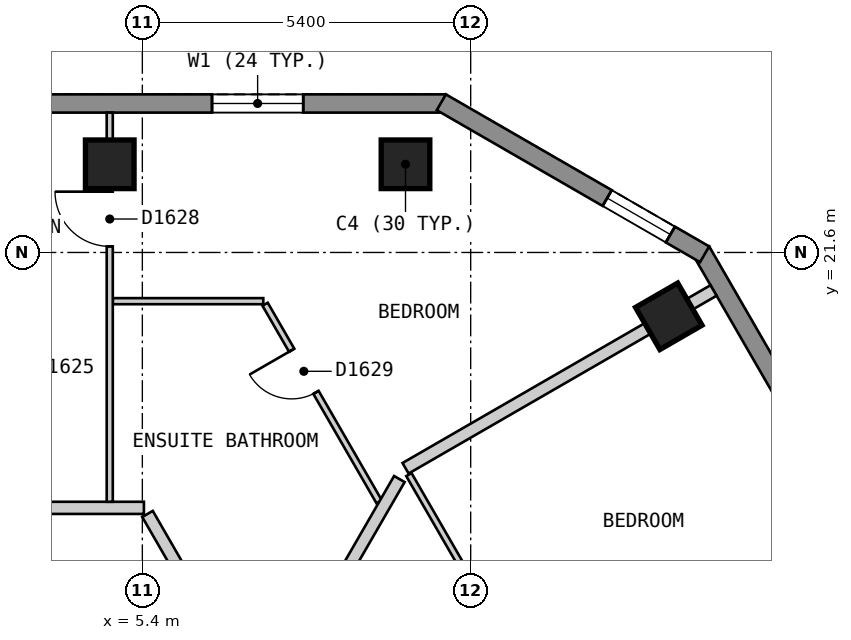
"""IFC4 building model, lengths in metres.
Left out: names, types, materials, properties, quantities, classifications, styles, units other than length and angle.
Written with IfcOpenShell. Run it as: python <this file> out.ifc"""

import sys

from ifc_helpers import new_model, si_unit, direction, frame, frame_2d, origin, origin_2d, place, context, subcontext, project, spatial, polyline, rectangle, outline, extrude, element, fill, save


model = new_model("IFC4")
c1 = context("Model", 3, precision=1e-05, world=origin(), true_north=direction((0.0, 1.0)))
c2 = subcontext(c1, "Body", "Model", "MODEL_VIEW")
j1 = project(units=[si_unit("LENGTHUNIT", "METRE"), si_unit("PLANEANGLEUNIT", "RADIAN")], contexts=[c1])
p1 = place(None, origin())
s1 = spatial("IfcSite", under=j1, at=p1, CompositionType="ELEMENT")
p2 = place(p1, origin())
s2 = spatial("IfcBuilding", under=s1, at=p2, CompositionType="ELEMENT")
p3 = place(p2, frame((0.0, 0.0, 169.2)))
s3 = spatial("IfcBuildingStorey", under=s2, at=p3, CompositionType="ELEMENT", Elevation=169.2)
for number, where, z_axis, x_axis in (
    (1, (9.728, 23.05, 0.0), (0.0, 0.0, 1.0), (-1.0, 0.0, 0.0)),
    (2, (4.864, 23.05, 0.0), (0.0, 0.0, 1.0), (-1.0, 0.0, 0.0)),
    (3, (14.058, 20.55, 0.0), (0.0, 0.0, 1.0), (-0.5, 0.866, 0.0)),
):
    element("IfcColumn", number, at=place(p3, frame(where, z_axis=z_axis, x_axis=x_axis)), inside=s3, PredefinedType="COLUMN", context=c2, shape_type="SweptSolid", body=[
        extrude(rectangle(XDim=0.8, YDim=0.8, at=origin_2d()), origin(), (0.0, 0.0, 1.0), 3.0),
    ])
p4 = place(p3, frame((10.392, 24.05, 0.0), z_axis=(0.0, 0.0, 1.0), x_axis=(-1.0, 0.0, 0.0)))
e4 = element("IfcWall", 4, at=p4, inside=s3, PredefinedType="SOLIDWALL", context=c2, shape_type="SweptSolid", body=[
    extrude(outline(polyline([(0.0, -0.15), (20.784, -0.15), (20.704, 0.15), (0.08, 0.15), (0.0, -0.15)])), origin(), (0.0, 0.0, 1.0), 2.7),
])
p5 = place(p4, frame((2.346, 0.0, 0.15)))
e5 = element("IfcOpeningElement", 5, at=p5, cuts=e4, PredefinedType="OPENING", context=c2, shape_type="SweptSolid", body=[
    extrude(rectangle(XDim=1.5, YDim=2.1, at=frame_2d((0.75, 1.05))), frame((0.0, 0.16, 0.0), z_axis=(0.0, -1.0, 0.0), x_axis=(1.0, 0.0, 0.0)), (0.0, 0.0, 1.0), 0.32),
])
p6 = place(p4, frame((7.21, 0.0, 0.15)))
e6 = element("IfcOpeningElement", 6, at=p6, cuts=e4, PredefinedType="OPENING", context=c2, shape_type="SweptSolid", body=[
    extrude(rectangle(XDim=1.5, YDim=2.1, at=frame_2d((0.75, 1.05))), frame((0.0, 0.16, 0.0), z_axis=(0.0, -1.0, 0.0), x_axis=(1.0, 0.0, 0.0)), (0.0, 0.0, 1.0), 0.32),
])
p7 = place(p4, frame((12.074, 0.0, 0.15)))
e7 = element("IfcOpeningElement", 7, at=p7, cuts=e4, PredefinedType="OPENING", context=c2, shape_type="SweptSolid", body=[
    extrude(rectangle(XDim=1.5, YDim=2.1, at=frame_2d((0.75, 1.05))), frame((0.0, 0.16, 0.0), z_axis=(0.0, -1.0, 0.0), x_axis=(1.0, 0.0, 0.0)), (0.0, 0.0, 1.0), 0.32),
])
p8 = place(p4, frame((16.938, 0.0, 0.15)))
e8 = element("IfcOpeningElement", 8, at=p8, cuts=e4, PredefinedType="OPENING", context=c2, shape_type="SweptSolid", body=[
    extrude(rectangle(XDim=1.5, YDim=2.1, at=frame_2d((0.75, 1.05))), frame((0.0, 0.16, 0.0), z_axis=(0.0, -1.0, 0.0), x_axis=(1.0, 0.0, 0.0)), (0.0, 0.0, 1.0), 0.32),
])
p9 = place(p3, frame((26.024, 1.825, 0.0), z_axis=(0.0, 0.0, 1.0), x_axis=(-0.500010537973, 0.866019319597, 0.0)))
e9 = element("IfcWall", 9, at=p9, inside=s3, PredefinedType="SOLIDWALL", context=c2, shape_type="SweptSolid", body=[
    extrude(outline(polyline([(0.0, -0.15), (22.863, -0.15), (22.783, 0.15), (0.08, 0.15), (0.0, -0.15)])), origin(), (0.0, 0.0, 1.0), 2.7),
])
p10 = place(p9, frame((2.606, 0.0, 0.15)))
e10 = element("IfcOpeningElement", 10, at=p10, cuts=e9, PredefinedType="OPENING", context=c2, shape_type="SweptSolid", body=[
    extrude(rectangle(XDim=1.5, YDim=2.1, at=frame_2d((0.75, 1.05))), frame((0.0, 0.16, 0.0), z_axis=(0.0, -1.0, 0.0), x_axis=(1.0, 0.0, 0.0)), (0.0, 0.0, 1.0), 0.32),
])
p11 = place(p9, frame((7.99, 0.0, 0.15)))
e11 = element("IfcOpeningElement", 11, at=p11, cuts=e9, PredefinedType="OPENING", context=c2, shape_type="SweptSolid", body=[
    extrude(rectangle(XDim=1.5, YDim=2.1, at=frame_2d((0.75, 1.05))), frame((0.0, 0.16, 0.0), z_axis=(0.0, -1.0, 0.0), x_axis=(1.0, 0.0, 0.0)), (0.0, 0.0, 1.0), 0.32),
])
p12 = place(p9, frame((13.373, 0.0, 0.15)))
e12 = element("IfcOpeningElement", 12, at=p12, cuts=e9, PredefinedType="OPENING", context=c2, shape_type="SweptSolid", body=[
    extrude(rectangle(XDim=1.5, YDim=2.1, at=frame_2d((0.75, 1.05))), frame((0.0, 0.16, 0.0), z_axis=(0.0, -1.0, 0.0), x_axis=(1.0, 0.0, 0.0)), (0.0, 0.0, 1.0), 0.32),
])
p13 = place(p9, frame((18.758, 0.0, 0.15)))
e13 = element("IfcOpeningElement", 13, at=p13, cuts=e9, PredefinedType="OPENING", context=c2, shape_type="SweptSolid", body=[
    extrude(rectangle(XDim=1.5, YDim=2.1, at=frame_2d((0.75, 1.05))), frame((0.0, 0.16, 0.0), z_axis=(0.0, -1.0, 0.0), x_axis=(1.0, 0.0, 0.0)), (0.0, 0.0, 1.0), 0.32),
])
p14 = place(p3, frame((14.647, 21.57, 0.0), z_axis=(0.0, 0.0, 1.0), x_axis=(-0.866022959057, 0.500004234368, 0.0)))
e14 = element("IfcWall", 14, at=p14, inside=s3, PredefinedType="SOLIDWALL", context=c2, shape_type="SweptSolid", body=[
    extrude(outline(polyline([(0.0, -0.15), (5.0, -0.15), (4.92, 0.15), (0.08, 0.15), (0.0, -0.15)])), origin(), (0.0, 0.0, 1.0), 2.7),
])
p15 = place(p14, frame((0.65, 0.0, 0.15)))
e15 = element("IfcOpeningElement", 15, at=p15, cuts=e14, PredefinedType="OPENING", context=c2, shape_type="SweptSolid", body=[
    extrude(rectangle(XDim=1.2, YDim=2.1, at=frame_2d((0.6, 1.05))), frame((0.0, 0.16, 0.0), z_axis=(0.0, -1.0, 0.0), x_axis=(1.0, 0.0, 0.0)), (0.0, 0.0, 1.0), 0.32),
])
p16 = place(p3, frame((5.485, 17.3, 0.0), z_axis=(0.0, 0.0, 1.0), x_axis=(0.499965832213, -0.866045129667, 0.0)))
e16 = element("IfcWall", 16, at=p16, inside=s3, PredefinedType="PARTITIONING", context=c2, shape_type="SweptSolid", body=[
    extrude(rectangle(XDim=10.739, YDim=0.2, at=frame_2d((5.369, 0.0))), origin(), (0.0, 0.0, 1.0), 2.7),
])
p17 = place(p16, frame((9.047, 0.0, 0.0)))
e17 = element("IfcOpeningElement", 17, at=p17, cuts=e16, PredefinedType="OPENING", context=c2, shape_type="SweptSolid", body=[
    extrude(rectangle(XDim=1.0, YDim=2.1, at=frame_2d((0.5, 1.05))), frame((0.0, 0.11, 0.0), z_axis=(0.0, -1.0, 0.0), x_axis=(1.0, 0.0, 0.0)), (0.0, 0.0, 1.0), 0.22),
])
p18 = place(p3, frame((-5.312, 17.4, 0.0), z_axis=(0.0, 0.0, 1.0), x_axis=(1.0, 0.0, 0.0)))
e18 = element("IfcWall", 18, at=p18, inside=s3, PredefinedType="PARTITIONING", context=c2, shape_type="SweptSolid", body=[
    extrude(rectangle(XDim=10.738, YDim=0.2, at=frame_2d((5.369, 0.0))), origin(), (0.0, 0.0, 1.0), 2.7),
])
p19 = place(p18, frame((7.294, 0.0, 0.0)))
e19 = element("IfcOpeningElement", 19, at=p19, cuts=e18, PredefinedType="OPENING", context=c2, shape_type="SweptSolid", body=[
    extrude(rectangle(XDim=0.9, YDim=2.1, at=frame_2d((0.45, 1.05))), frame((0.0, 0.11, 0.0), z_axis=(0.0, -1.0, 0.0), x_axis=(1.0, 0.0, 0.0)), (0.0, 0.0, 1.0), 0.22),
])
p20 = place(p3, frame((7.419, 20.749, 0.0), z_axis=(0.0, 0.0, 1.0), x_axis=(0.499917691695, -0.866072919292, 0.0)))
e20 = element("IfcWall", 20, at=p20, inside=s3, PredefinedType="PARTITIONING", context=c2, shape_type="SweptSolid", body=[
    extrude(rectangle(XDim=3.753, YDim=0.1, at=frame_2d((1.876, 0.0))), origin(), (0.0, 0.0, 1.0), 2.7),
])
p21 = place(p20, frame((0.874, 0.0, 0.0)))
e21 = element("IfcOpeningElement", 21, at=p21, cuts=e20, PredefinedType="OPENING", context=c2, shape_type="SweptSolid", body=[
    extrude(rectangle(XDim=0.8, YDim=2.1, at=frame_2d((0.4, 1.05))), frame((0.0, 0.06, 0.0), z_axis=(0.0, -1.0, 0.0), x_axis=(1.0, 0.0, 0.0)), (0.0, 0.0, 1.0), 0.12),
])
p22 = place(p3, frame((9.784, 17.947, 0.0), z_axis=(0.0, 0.0, 1.0), x_axis=(0.500016228266, -0.866016034188, 0.0)))
e22 = element("IfcWall", 22, at=p22, inside=s3, PredefinedType="PARTITIONING", context=c2, shape_type="SweptSolid", body=[
    extrude(rectangle(XDim=11.486, YDim=0.1, at=frame_2d((5.743, 0.0))), origin(), (0.0, 0.0, 1.0), 2.7),
])
p23 = place(p22, frame((7.518, 0.0, 0.0)))
e23 = element("IfcOpeningElement", 23, at=p23, cuts=e22, PredefinedType="OPENING", context=c2, shape_type="SweptSolid", body=[
    extrude(rectangle(XDim=0.9, YDim=2.1, at=frame_2d((0.45, 1.05))), frame((0.0, 0.06, 0.0), z_axis=(0.0, -1.0, 0.0), x_axis=(1.0, 0.0, 0.0)), (0.0, 0.0, 1.0), 0.12),
])
p24 = place(p3, frame((4.914, 20.799, 0.0), z_axis=(0.0, 0.0, 1.0), x_axis=(1.0, 0.0, 0.0)))
e24 = element("IfcWall", 24, at=p24, inside=s3, PredefinedType="PARTITIONING", context=c2, shape_type="SweptSolid", body=[
    extrude(rectangle(XDim=2.475, YDim=0.1, at=frame_2d((1.237, 0.0))), origin(), (0.0, 0.0, 1.0), 2.7),
])
p25 = place(p3, frame((4.864, 17.5, 0.0), z_axis=(0.0, 0.0, 1.0), x_axis=(0.0, 1.0, 0.0)))
e25 = element("IfcWall", 25, at=p25, inside=s3, PredefinedType="PARTITIONING", context=c2, shape_type="SweptSolid", body=[
    extrude(rectangle(XDim=6.4, YDim=0.1, at=frame_2d((3.2, 0.0))), origin(), (0.0, 0.0, 1.0), 2.7),
])
p26 = place(p25, frame((4.2, 0.0, 0.0)))
e26 = element("IfcOpeningElement", 26, at=p26, cuts=e25, PredefinedType="OPENING", context=c2, shape_type="SweptSolid", body=[
    extrude(rectangle(XDim=0.9, YDim=2.1, at=frame_2d((0.45, 1.05))), frame((0.0, 0.06, 0.0), z_axis=(0.0, -1.0, 0.0), x_axis=(1.0, 0.0, 0.0)), (0.0, 0.0, 1.0), 0.12),
])
p27 = place(p3, frame((7.448, 14.1, 0.0), z_axis=(0.0, 0.0, 1.0), x_axis=(0.500013426303, 0.866017651966, 0.0)))
e27 = element("IfcWall", 27, at=p27, inside=s3, PredefinedType="PARTITIONING", context=c2, shape_type="SweptSolid", body=[
    extrude(rectangle(XDim=4.358, YDim=0.2, at=frame_2d((2.179, 0.0))), origin(), (0.0, 0.0, 1.0), 2.7),
])
p28 = place(p3, frame((9.729, 18.051, 0.0), z_axis=(0.0, 0.0, 1.0), x_axis=(0.866038213712, 0.499977811898, 0.0)))
e28 = element("IfcWall", 28, at=p28, inside=s3, PredefinedType="PARTITIONING", context=c2, shape_type="SweptSolid", body=[
    extrude(rectangle(XDim=5.848, YDim=0.2, at=frame_2d((2.924, 0.0))), origin(), (0.0, 0.0, 1.0), 2.7),
])
p29 = place(p5, origin())
e29 = element("IfcWindow", 29, at=p29, inside=s3, PartitioningType="SINGLE_PANEL", PredefinedType="WINDOW", context=c2, shape_type="SweptSolid", body=[
    extrude(rectangle(XDim=1.5, YDim=2.1, at=frame_2d((0.75, 1.05))), frame((0.0, 0.03, 0.0), z_axis=(0.0, -1.0, 0.0), x_axis=(1.0, 0.0, 0.0)), (0.0, 0.0, 1.0), 0.06),
])
fill(e5, e29)
p30 = place(p15, origin())
e30 = element("IfcWindow", 30, at=p30, inside=s3, PartitioningType="SINGLE_PANEL", PredefinedType="WINDOW", context=c2, shape_type="SweptSolid", body=[
    extrude(rectangle(XDim=1.2, YDim=2.1, at=frame_2d((0.6, 1.05))), frame((0.0, 0.03, 0.0), z_axis=(0.0, -1.0, 0.0), x_axis=(1.0, 0.0, 0.0)), (0.0, 0.0, 1.0), 0.06),
])
fill(e15, e30)
p31 = place(p26, origin())
e31 = element("IfcDoor", 31, at=p31, inside=s3, OperationType="SINGLE_SWING_RIGHT", PredefinedType="DOOR", context=c2, shape_type="SweptSolid", body=[
    extrude(rectangle(XDim=0.9, YDim=2.1, at=frame_2d((0.45, 1.05))), frame((0.0, 0.025, 0.0), z_axis=(0.0, -1.0, 0.0), x_axis=(1.0, 0.0, 0.0)), (0.0, 0.0, 1.0), 0.05),
])
fill(e26, e31)
p32 = place(p21, origin())
e32 = element("IfcDoor", 32, at=p32, inside=s3, OperationType="SINGLE_SWING_LEFT", PredefinedType="DOOR", context=c2, shape_type="SweptSolid", body=[
    extrude(rectangle(XDim=0.8, YDim=2.1, at=frame_2d((0.4, 1.05))), frame((0.0, 0.025, 0.0), z_axis=(0.0, -1.0, 0.0), x_axis=(1.0, 0.0, 0.0)), (0.0, 0.0, 1.0), 0.05),
])
fill(e21, e32)
save(model, sys.argv[1])
